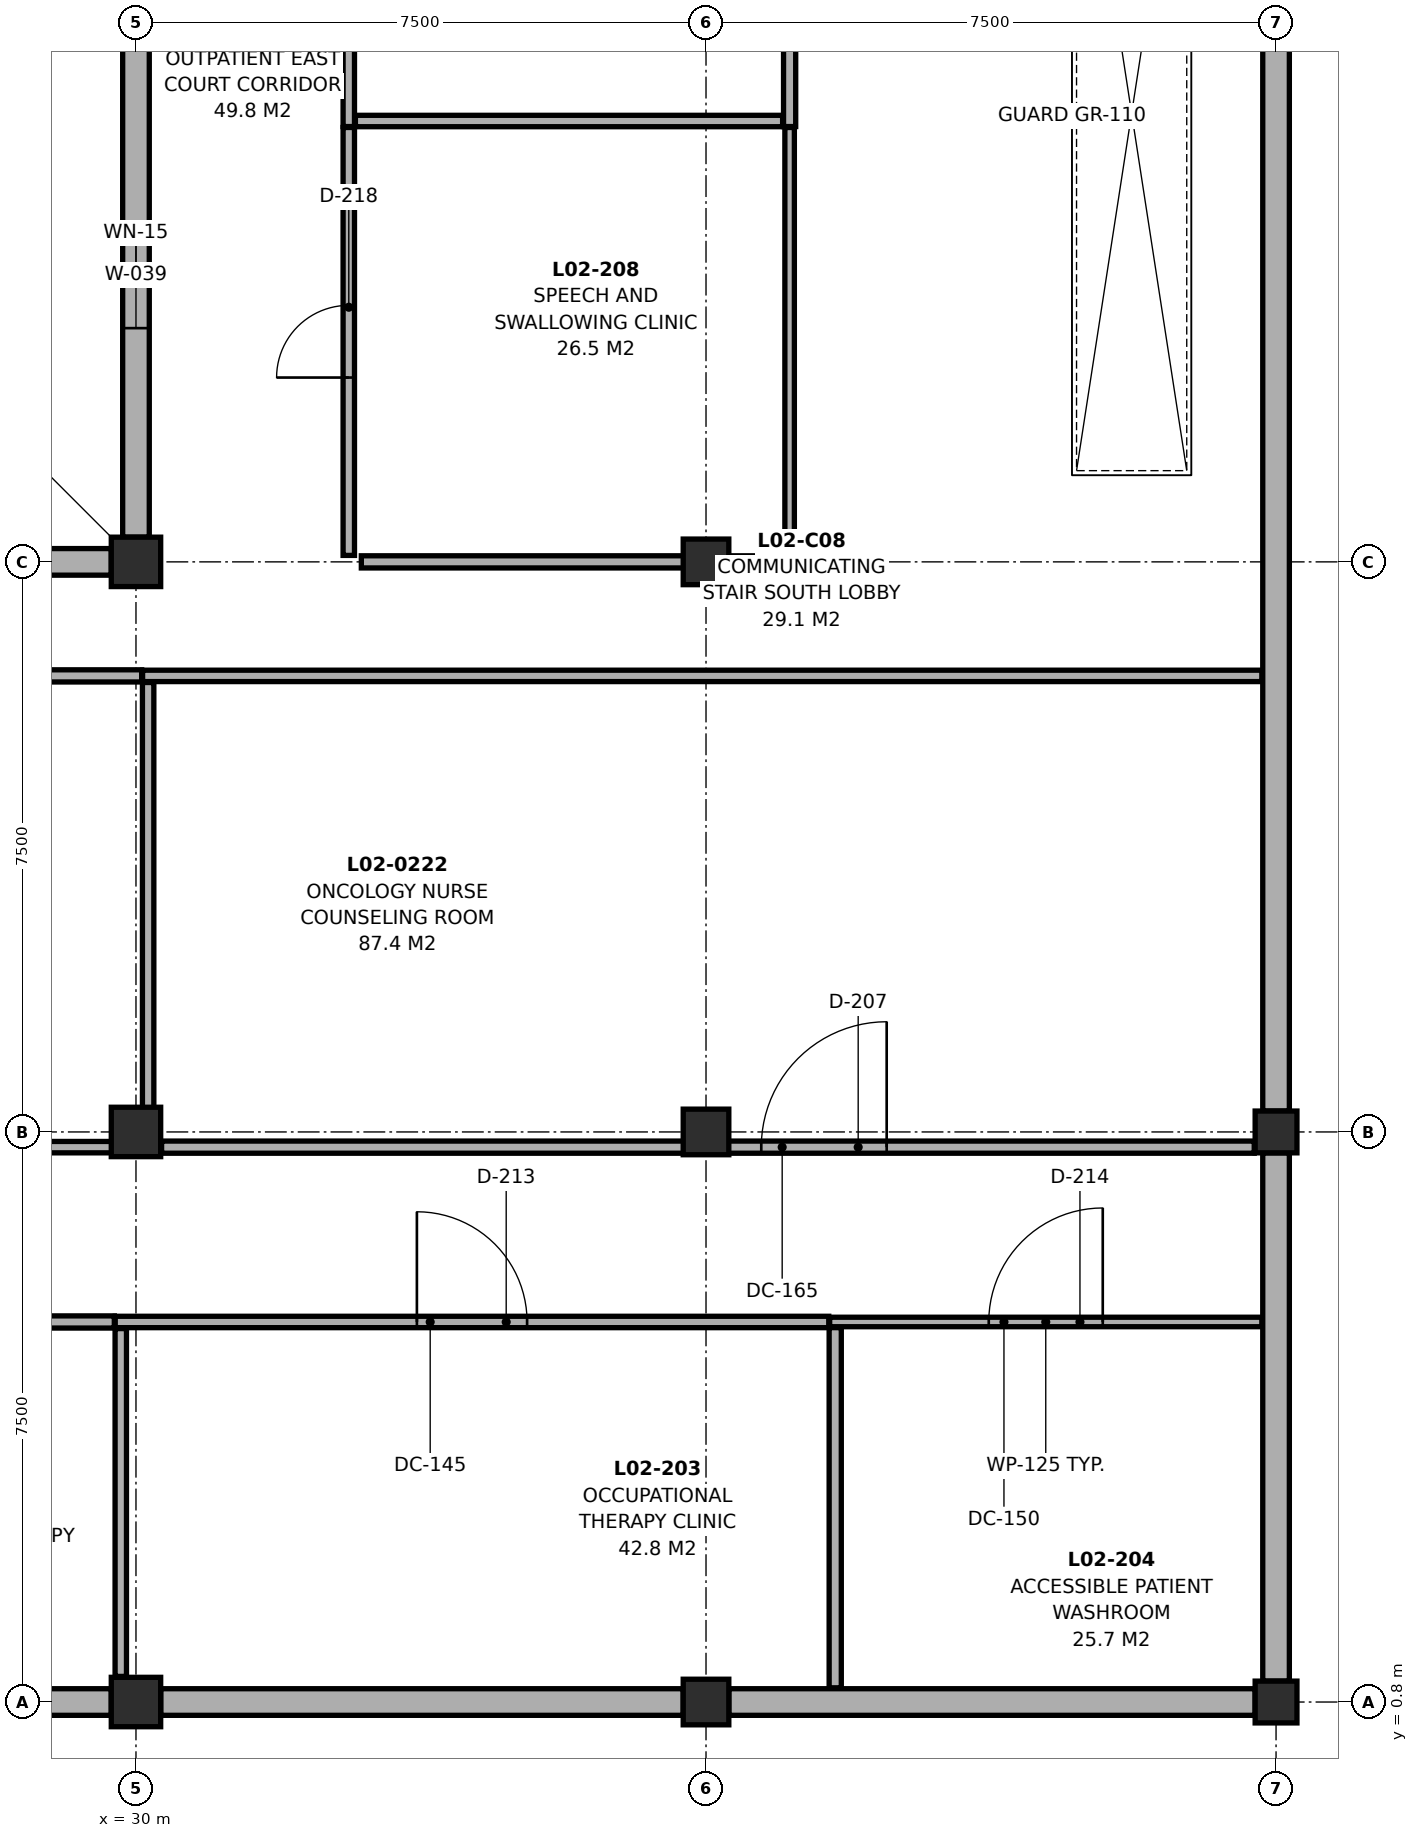
"""IFC4 building model, lengths in metres.
Left out: names, types, materials, properties, quantities, classifications, styles, units other than length and angle.
Written with IfcOpenShell. Run it as: python <this file> out.ifc"""

import sys

from ifc_helpers import new_model, si_unit, direction, frame, frame_2d, origin, origin_2d, place, context, subcontext, project, spatial, rectangle, extrude, element, fill, save


model = new_model("IFC4")
c1 = context("Model", 3, precision=1e-05, world=origin(), true_north=direction((0.0, 1.0)))
c2 = subcontext(c1, "Body", "Model", "MODEL_VIEW")
j1 = project(units=[si_unit("LENGTHUNIT", "METRE"), si_unit("PLANEANGLEUNIT", "RADIAN")], contexts=[c1])
p1 = place(None, origin())
s1 = spatial("IfcSite", under=j1, at=p1, CompositionType="ELEMENT")
p2 = place(p1, origin())
s2 = spatial("IfcBuilding", under=s1, at=p2, CompositionType="ELEMENT")
p3 = place(p2, frame((0.0, 0.0, 9.5)))
s3 = spatial("IfcBuildingStorey", under=s2, at=p3, CompositionType="ELEMENT", Elevation=9.5)
for number, where, z_axis, x_axis in (
    (1, (30.0, 0.8, 0.0), (0.0, 0.0, 1.0), (1.0, 0.0, 0.0)),
    (2, (30.0, 8.3, 0.0), (0.0, 0.0, 1.0), (1.0, 0.0, 0.0)),
    (3, (30.0, 15.8, 0.0), (0.0, 0.0, 1.0), (1.0, 0.0, 0.0)),
):
    element("IfcColumn", number, at=place(p3, frame(where, z_axis=z_axis, x_axis=x_axis)), inside=s3, PredefinedType="COLUMN", context=c2, shape_type="SweptSolid", body=[
        extrude(rectangle(XDim=0.65, YDim=0.65, at=origin_2d()), origin(), (0.0, 0.0, 1.0), 3.7),
    ])
for number, where, z_axis, x_axis in (
    (4, (37.5, 0.8, 0.0), (0.0, 0.0, 1.0), (1.0, 0.0, 0.0)),
    (5, (37.5, 8.3, 0.0), (0.0, 0.0, 1.0), (1.0, 0.0, 0.0)),
    (6, (37.5, 15.8, 0.0), (0.0, 0.0, 1.0), (1.0, 0.0, 0.0)),
):
    element("IfcColumn", number, at=place(p3, frame(where, z_axis=z_axis, x_axis=x_axis)), inside=s3, PredefinedType="COLUMN", context=c2, shape_type="SweptSolid", body=[
        extrude(rectangle(XDim=0.6, YDim=0.6, at=origin_2d()), origin(), (0.0, 0.0, 1.0), 3.7),
    ])
for number, where, z_axis, x_axis in (
    (7, (45.0, 0.8, 0.0), (0.0, 0.0, 1.0), (1.0, 0.0, 0.0)),
    (8, (45.0, 8.3, 0.0), (0.0, 0.0, 1.0), (1.0, 0.0, 0.0)),
):
    element("IfcColumn", number, at=place(p3, frame(where, z_axis=z_axis, x_axis=x_axis)), inside=s3, PredefinedType="COLUMN", context=c2, shape_type="SweptSolid", body=[
        extrude(rectangle(XDim=0.55, YDim=0.55, at=origin_2d()), origin(), (0.0, 0.0, 1.0), 3.75),
    ])
p4 = place(p3, frame((45.0, 30.525, 0.0), z_axis=(0.0, 0.0, 1.0), x_axis=(0.0, -1.0, 0.0)))
e9 = element("IfcWall", 9, at=p4, inside=s3, PredefinedType="SOLIDWALL", context=c2, shape_type="SweptSolid", body=[
    extrude(rectangle(XDim=21.95, YDim=0.35, at=frame_2d((10.975, 0.0))), origin(), (0.0, 0.0, 1.0), 2.985),
])
p5 = place(p3, frame((45.0, 8.025, 0.0), z_axis=(0.0, 0.0, 1.0), x_axis=(0.0, -1.0, 0.0)))
e10 = element("IfcWall", 10, at=p5, inside=s3, PredefinedType="SOLIDWALL", context=c2, shape_type="SweptSolid", body=[
    extrude(rectangle(XDim=6.95, YDim=0.35, at=frame_2d((3.475, 0.0))), origin(), (0.0, 0.0, 1.0), 2.985),
])
p6 = place(p3, frame((44.725, 0.8, 0.0), z_axis=(0.0, 0.0, 1.0), x_axis=(-1.0, 0.0, 0.0)))
e11 = element("IfcWall", 11, at=p6, inside=s3, PredefinedType="SOLIDWALL", context=c2, shape_type="SweptSolid", body=[
    extrude(rectangle(XDim=6.925, YDim=0.35, at=frame_2d((3.462, 0.0))), origin(), (0.0, 0.0, 1.0), 2.985),
])
p7 = place(p3, frame((37.2, 0.8, 0.0), z_axis=(0.0, 0.0, 1.0), x_axis=(-1.0, 0.0, 0.0)))
e12 = element("IfcWall", 12, at=p7, inside=s3, PredefinedType="SOLIDWALL", context=c2, shape_type="SweptSolid", body=[
    extrude(rectangle(XDim=6.875, YDim=0.35, at=frame_2d((3.438, 0.0))), origin(), (0.0, 0.0, 1.0), 2.985),
])
p8 = place(p3, frame((29.675, 0.8, 0.0), z_axis=(0.0, 0.0, 1.0), x_axis=(-1.0, 0.0, 0.0)))
e13 = element("IfcWall", 13, at=p8, inside=s3, PredefinedType="SOLIDWALL", context=c2, shape_type="SweptSolid", body=[
    extrude(rectangle(XDim=6.85, YDim=0.35, at=frame_2d((3.425, 0.0))), origin(), (0.0, 0.0, 1.0), 2.785),
])
p9 = place(p3, frame((22.825, 15.8, 0.0), z_axis=(0.0, 0.0, 1.0), x_axis=(1.0, 0.0, 0.0)))
e14 = element("IfcWall", 14, at=p9, inside=s3, PredefinedType="SOLIDWALL", context=c2, shape_type="SweptSolid", body=[
    extrude(rectangle(XDim=6.85, YDim=0.35, at=frame_2d((3.425, 0.0))), origin(), (0.0, 0.0, 1.0), 2.785),
])
p10 = place(p9, frame((2.725, 0.0, 0.9)))
e15 = element("IfcOpeningElement", 15, at=p10, cuts=e14, PredefinedType="OPENING", context=c2, shape_type="SweptSolid", body=[
    extrude(rectangle(XDim=1.4, YDim=1.5, at=frame_2d((0.7, 0.75))), frame((0.0, 0.187, 0.0), z_axis=(0.0, -1.0, 0.0), x_axis=(1.0, 0.0, 0.0)), (0.0, 0.0, 1.0), 0.374),
])
p11 = place(p3, frame((30.0, 16.125, 0.0), z_axis=(0.0, 0.0, 1.0), x_axis=(0.0, 1.0, 0.0)))
e16 = element("IfcWall", 16, at=p11, inside=s3, PredefinedType="SOLIDWALL", context=c2, shape_type="SweptSolid", body=[
    extrude(rectangle(XDim=6.9, YDim=0.35, at=frame_2d((3.45, 0.0))), origin(), (0.0, 0.0, 1.0), 2.985),
])
p12 = place(p11, frame((2.75, 0.0, 0.9)))
e17 = element("IfcOpeningElement", 17, at=p12, cuts=e16, PredefinedType="OPENING", context=c2, shape_type="SweptSolid", body=[
    extrude(rectangle(XDim=1.4, YDim=1.7, at=frame_2d((0.7, 0.85))), frame((0.0, 0.187, 0.0), z_axis=(0.0, -1.0, 0.0), x_axis=(1.0, 0.0, 0.0)), (0.0, 0.0, 1.0), 0.374),
])
p13 = place(p3, frame((22.527, 5.8, 0.0), z_axis=(0.0, 0.0, 1.0), x_axis=(1.0, 0.0, 0.0)))
e18 = element("IfcWall", 18, at=p13, inside=s3, PredefinedType="PARTITIONING", context=c2, shape_type="SweptSolid", body=[
    extrude(rectangle(XDim=7.188, YDim=0.16, at=frame_2d((3.594, 0.0))), origin(), (0.0, 0.0, 1.0), 2.785),
])
p14 = place(p13, frame((2.894, 0.0, 0.0)))
e19 = element("IfcOpeningElement", 19, at=p14, cuts=e18, PredefinedType="OPENING", context=c2, shape_type="SweptSolid", body=[
    extrude(rectangle(XDim=1.4, YDim=2.25, at=frame_2d((0.7, 1.125))), frame((0.0, 0.092, 0.0), z_axis=(0.0, -1.0, 0.0), x_axis=(1.0, 0.0, 0.0)), (0.0, 0.0, 1.0), 0.184),
])
p15 = place(p3, frame((29.727, 5.8, 0.0), z_axis=(0.0, 0.0, 1.0), x_axis=(1.0, 0.0, 0.0)))
e20 = element("IfcWall", 20, at=p15, inside=s3, PredefinedType="PARTITIONING", context=c2, shape_type="SweptSolid", body=[
    extrude(rectangle(XDim=9.388, YDim=0.15, at=frame_2d((4.694, 0.0))), origin(), (0.0, 0.0, 1.0), 2.985),
])
p16 = place(p15, frame((3.969, 0.0, 0.0)))
e21 = element("IfcOpeningElement", 21, at=p16, cuts=e20, PredefinedType="OPENING", context=c2, shape_type="SweptSolid", body=[
    extrude(rectangle(XDim=1.45, YDim=2.26, at=frame_2d((0.725, 1.13))), frame((0.0, 0.087, 0.0), z_axis=(0.0, -1.0, 0.0), x_axis=(1.0, 0.0, 0.0)), (0.0, 0.0, 1.0), 0.174),
])
p17 = place(p3, frame((39.127, 5.8, 0.0), z_axis=(0.0, 0.0, 1.0), x_axis=(1.0, 0.0, 0.0)))
e22 = element("IfcWall", 22, at=p17, inside=s3, PredefinedType="PARTITIONING", context=c2, shape_type="SweptSolid", body=[
    extrude(rectangle(XDim=5.686, YDim=0.125, at=frame_2d((2.843, 0.0))), origin(), (0.0, 0.0, 1.0), 3.085),
])
p18 = place(p17, frame((2.093, 0.0, 0.0)))
e23 = element("IfcOpeningElement", 23, at=p18, cuts=e22, PredefinedType="OPENING", context=c2, shape_type="SweptSolid", body=[
    extrude(rectangle(XDim=1.5, YDim=2.28, at=frame_2d((0.75, 1.14))), frame((0.0, 0.074, 0.0), z_axis=(0.0, -1.0, 0.0), x_axis=(1.0, 0.0, 0.0)), (0.0, 0.0, 1.0), 0.149),
])
p19 = place(p3, frame((15.337, 8.1, 0.0), z_axis=(0.0, 0.0, 1.0), x_axis=(1.0, 0.0, 0.0)))
e24 = element("IfcWall", 24, at=p19, inside=s3, PredefinedType="PARTITIONING", context=c2, shape_type="SweptSolid", body=[
    extrude(rectangle(XDim=14.571, YDim=0.15, at=frame_2d((7.286, 0.0))), origin(), (0.0, 0.0, 1.0), 2.785),
])
p20 = place(p19, frame((7.677, 0.0, 0.0)))
e25 = element("IfcOpeningElement", 25, at=p20, cuts=e24, PredefinedType="OPENING", context=c2, shape_type="SweptSolid", body=[
    extrude(rectangle(XDim=1.56, YDim=2.3, at=frame_2d((0.78, 1.15))), frame((0.0, 0.087, 0.0), z_axis=(0.0, -1.0, 0.0), x_axis=(1.0, 0.0, 0.0)), (0.0, 0.0, 1.0), 0.174),
])
p21 = place(p3, frame((30.337, 8.1, 0.0), z_axis=(0.0, 0.0, 1.0), x_axis=(1.0, 0.0, 0.0)))
e26 = element("IfcWall", 26, at=p21, inside=s3, PredefinedType="PARTITIONING", context=c2, shape_type="SweptSolid", body=[
    extrude(rectangle(XDim=14.376, YDim=0.16, at=frame_2d((7.188, 0.0))), origin(), (0.0, 0.0, 1.0), 2.985),
])
p22 = place(p21, frame((7.89, 0.0, 0.0)))
e27 = element("IfcOpeningElement", 27, at=p22, cuts=e26, PredefinedType="OPENING", context=c2, shape_type="SweptSolid", body=[
    extrude(rectangle(XDim=1.65, YDim=2.32, at=frame_2d((0.825, 1.16))), frame((0.0, 0.092, 0.0), z_axis=(0.0, -1.0, 0.0), x_axis=(1.0, 0.0, 0.0)), (0.0, 0.0, 1.0), 0.184),
])
p23 = place(p3, frame((32.8, 15.885, 0.0), z_axis=(0.0, 0.0, 1.0), x_axis=(0.0, 1.0, 0.0)))
e28 = element("IfcWall", 28, at=p23, inside=s3, PredefinedType="PARTITIONING", context=c2, shape_type="SweptSolid", body=[
    extrude(rectangle(XDim=5.63, YDim=0.15, at=frame_2d((2.815, 0.0))), origin(), (0.0, 0.0, 1.0), 2.985),
])
p24 = place(p23, frame((2.34, 0.0, 0.0)))
e29 = element("IfcOpeningElement", 29, at=p24, cuts=e28, PredefinedType="OPENING", context=c2, shape_type="SweptSolid", body=[
    extrude(rectangle(XDim=0.95, YDim=2.15, at=frame_2d((0.475, 1.075))), frame((0.0, 0.087, 0.0), z_axis=(0.0, -1.0, 0.0), x_axis=(1.0, 0.0, 0.0)), (0.0, 0.0, 1.0), 0.174),
])
p25 = place(p3, frame((32.8, 21.527, 0.0), z_axis=(0.0, 0.0, 1.0), x_axis=(0.0, 1.0, 0.0)))
e30 = element("IfcWall", 30, at=p25, inside=s3, PredefinedType="PARTITIONING", context=c2, shape_type="SweptSolid", body=[
    extrude(rectangle(XDim=5.788, YDim=0.15, at=frame_2d((2.894, 0.0))), origin(), (0.0, 0.0, 1.0), 2.985),
])
p26 = place(p25, frame((2.434, 0.0, 0.0)))
e31 = element("IfcOpeningElement", 31, at=p26, cuts=e30, PredefinedType="OPENING", context=c2, shape_type="SweptSolid", body=[
    extrude(rectangle(XDim=0.92, YDim=2.1, at=frame_2d((0.46, 1.05))), frame((0.0, 0.087, 0.0), z_axis=(0.0, -1.0, 0.0), x_axis=(1.0, 0.0, 0.0)), (0.0, 0.0, 1.0), 0.174),
])
p27 = place(p3, frame((15.485, 14.3, 0.0), z_axis=(0.0, 0.0, 1.0), x_axis=(1.0, 0.0, 0.0)))
e32 = element("IfcWall", 32, at=p27, inside=s3, PredefinedType="PARTITIONING", context=c2, shape_type="SweptSolid", body=[
    extrude(rectangle(XDim=14.59, YDim=0.16, at=frame_2d((7.295, 0.0))), origin(), (0.0, 0.0, 1.0), 2.785),
])
p28 = place(p3, frame((30.087, 14.3, 0.0), z_axis=(0.0, 0.0, 1.0), x_axis=(1.0, 0.0, 0.0)))
e33 = element("IfcWall", 33, at=p28, inside=s3, PredefinedType="PARTITIONING", context=c2, shape_type="SweptSolid", body=[
    extrude(rectangle(XDim=14.726, YDim=0.15, at=frame_2d((7.363, 0.0))), origin(), (0.0, 0.0, 1.0), 2.985),
])
p29 = place(p3, frame((38.6, 15.885, 0.0), z_axis=(0.0, 0.0, 1.0), x_axis=(0.0, 1.0, 0.0)))
e34 = element("IfcWall", 34, at=p29, inside=s3, PredefinedType="PARTITIONING", context=c2, shape_type="SweptSolid", body=[
    extrude(rectangle(XDim=5.63, YDim=0.125, at=frame_2d((2.815, 0.0))), origin(), (0.0, 0.0, 1.0), 3.7),
])
p30 = place(p3, frame((38.6, 21.527, 0.0), z_axis=(0.0, 0.0, 1.0), x_axis=(0.0, 1.0, 0.0)))
e35 = element("IfcWall", 35, at=p30, inside=s3, PredefinedType="PARTITIONING", context=c2, shape_type="SweptSolid", body=[
    extrude(rectangle(XDim=5.788, YDim=0.16, at=frame_2d((2.894, 0.0))), origin(), (0.0, 0.0, 1.0), 3.7),
])
p31 = place(p3, frame((29.8, 1.137, 0.0), z_axis=(0.0, 0.0, 1.0), x_axis=(0.0, 1.0, 0.0)))
e36 = element("IfcWall", 36, at=p31, inside=s3, PredefinedType="PARTITIONING", context=c2, shape_type="SweptSolid", body=[
    extrude(rectangle(XDim=4.576, YDim=0.15, at=frame_2d((2.288, 0.0))), origin(), (0.0, 0.0, 1.0), 2.985),
])
p32 = place(p3, frame((39.2, 0.987, 0.0), z_axis=(0.0, 0.0, 1.0), x_axis=(0.0, 1.0, 0.0)))
e37 = element("IfcWall", 37, at=p32, inside=s3, PredefinedType="PARTITIONING", context=c2, shape_type="SweptSolid", body=[
    extrude(rectangle(XDim=4.739, YDim=0.16, at=frame_2d((2.369, 0.0))), origin(), (0.0, 0.0, 1.0), 3.035),
])
p33 = place(p3, frame((30.16, 8.432, 0.0), z_axis=(0.0, 0.0, 1.0), x_axis=(0.0, 1.0, 0.0)))
e38 = element("IfcWall", 38, at=p33, inside=s3, PredefinedType="PARTITIONING", context=c2, shape_type="SweptSolid", body=[
    extrude(rectangle(XDim=5.781, YDim=0.15, at=frame_2d((2.891, 0.0))), origin(), (0.0, 0.0, 1.0), 2.985),
])
p34 = place(p3, frame((32.965, 15.8, 0.0), z_axis=(0.0, 0.0, 1.0), x_axis=(1.0, 0.0, 0.0)))
e39 = element("IfcWall", 39, at=p34, inside=s3, PredefinedType="PARTITIONING", context=c2, shape_type="SweptSolid", body=[
    extrude(rectangle(XDim=5.47, YDim=0.16, at=frame_2d((2.735, 0.0))), origin(), (0.0, 0.0, 1.0), 2.985),
])
p35 = place(p3, frame((32.887, 21.6, 0.0), z_axis=(0.0, 0.0, 1.0), x_axis=(1.0, 0.0, 0.0)))
e40 = element("IfcWall", 40, at=p35, inside=s3, PredefinedType="PARTITIONING", context=c2, shape_type="SweptSolid", body=[
    extrude(rectangle(XDim=5.621, YDim=0.15, at=frame_2d((2.811, 0.0))), origin(), (0.0, 0.0, 1.0), 2.985),
])
p36 = place(p12, origin())
e41 = element("IfcWindow", 41, at=p36, inside=s3, PartitioningType="SINGLE_PANEL", PredefinedType="WINDOW", context=c2, shape_type="SweptSolid", body=[
    extrude(rectangle(XDim=1.4, YDim=1.7, at=frame_2d((0.7, 0.85))), frame((0.0, 0.03, 0.0), z_axis=(0.0, -1.0, 0.0), x_axis=(1.0, 0.0, 0.0)), (0.0, 0.0, 1.0), 0.06),
])
fill(e17, e41)
p37 = place(p16, origin())
e42 = element("IfcDoor", 42, at=p37, inside=s3, OperationType="SINGLE_SWING_LEFT", PredefinedType="DOOR", context=c2, shape_type="SweptSolid", body=[
    extrude(rectangle(XDim=1.45, YDim=2.26, at=frame_2d((0.725, 1.13))), frame((0.0, 0.025, 0.0), z_axis=(0.0, -1.0, 0.0), x_axis=(1.0, 0.0, 0.0)), (0.0, 0.0, 1.0), 0.05),
])
fill(e21, e42)
p38 = place(p18, origin())
e43 = element("IfcDoor", 43, at=p38, inside=s3, OperationType="SINGLE_SWING_RIGHT", PredefinedType="DOOR", context=c2, shape_type="SweptSolid", body=[
    extrude(rectangle(XDim=1.5, YDim=2.28, at=frame_2d((0.75, 1.14))), frame((0.0, 0.025, 0.0), z_axis=(0.0, -1.0, 0.0), x_axis=(1.0, 0.0, 0.0)), (0.0, 0.0, 1.0), 0.05),
])
fill(e23, e43)
p39 = place(p22, origin())
e44 = element("IfcDoor", 44, at=p39, inside=s3, OperationType="SINGLE_SWING_RIGHT", PredefinedType="DOOR", context=c2, shape_type="SweptSolid", body=[
    extrude(rectangle(XDim=1.65, YDim=2.32, at=frame_2d((0.825, 1.16))), frame((0.0, 0.025, 0.0), z_axis=(0.0, -1.0, 0.0), x_axis=(1.0, 0.0, 0.0)), (0.0, 0.0, 1.0), 0.05),
])
fill(e27, e44)
p40 = place(p24, origin())
e45 = element("IfcDoor", 45, at=p40, inside=s3, OperationType="SINGLE_SWING_LEFT", PredefinedType="DOOR", context=c2, shape_type="SweptSolid", body=[
    extrude(rectangle(XDim=0.95, YDim=2.15, at=frame_2d((0.475, 1.075))), frame((0.0, 0.025, 0.0), z_axis=(0.0, -1.0, 0.0), x_axis=(1.0, 0.0, 0.0)), (0.0, 0.0, 1.0), 0.05),
])
fill(e29, e45)
save(model, sys.argv[1])
